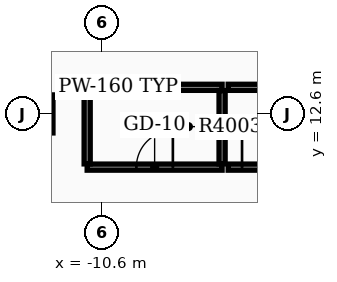
"""IFC4 building model, lengths in metres.
Left out: names, types, materials, properties, quantities, classifications, styles, units other than length and angle.
Written with IfcOpenShell. Run it as: python <this file> out.ifc"""

import sys

from ifc_helpers import new_model, si_unit, direction, frame, frame_2d, origin, origin_2d, place, context, subcontext, project, spatial, rectangle, extrude, element, fill, save


model = new_model("IFC4")
c1 = context("Model", 3, precision=1e-05, world=origin(), true_north=direction((0.0, 1.0)))
c2 = subcontext(c1, "Body", "Model", "MODEL_VIEW")
j1 = project(units=[si_unit("LENGTHUNIT", "METRE"), si_unit("PLANEANGLEUNIT", "RADIAN")], contexts=[c1])
p1 = place(None, origin())
s1 = spatial("IfcSite", under=j1, at=p1, CompositionType="ELEMENT")
p2 = place(p1, origin())
s2 = spatial("IfcBuilding", under=s1, at=p2, CompositionType="ELEMENT")
p3 = place(p2, frame((0.0, 0.0, 253.8)))
s3 = spatial("IfcBuildingStorey", under=s2, at=p3, CompositionType="ELEMENT", Elevation=253.8)
p4 = place(p3, frame((-12.4, 12.6, 0.0), z_axis=(0.0, 0.0, 1.0), x_axis=(1.0, 0.0, 0.0)))
e1 = element("IfcColumn", 1, at=p4, inside=s3, PredefinedType="COLUMN", context=c2, shape_type="SweptSolid", body=[
    extrude(rectangle(XDim=1.0, YDim=1.0, at=origin_2d()), origin(), (0.0, 0.0, 1.0), 3.9),
])
p5 = place(p3, frame((-11.0, 11.2, 0.0), z_axis=(0.0, 0.0, 1.0), x_axis=(1.0, 0.0, 0.0)))
e2 = element("IfcWall", 2, at=p5, inside=s3, PredefinedType="PARTITIONING", context=c2, shape_type="SweptSolid", body=[
    extrude(rectangle(XDim=3.55, YDim=0.16, at=frame_2d((1.775, 0.0))), origin(), (0.0, 0.0, 1.0), 3.17),
])
p6 = place(p5, frame((1.295, 0.0, 0.0)))
e3 = element("IfcOpeningElement", 3, at=p6, cuts=e2, PredefinedType="OPENING", context=c2, shape_type="SweptSolid", body=[
    extrude(rectangle(XDim=0.96, YDim=2.15, at=frame_2d((0.48, 1.075))), frame((0.0, 0.09, 0.0), z_axis=(0.0, -1.0, 0.0), x_axis=(1.0, 0.0, 0.0)), (0.0, 0.0, 1.0), 0.18),
])
p7 = place(p3, frame((-11.0, 13.3, 0.0), z_axis=(0.0, 0.0, 1.0), x_axis=(1.0, 0.0, 0.0)))
e4 = element("IfcWall", 4, at=p7, inside=s3, PredefinedType="PARTITIONING", context=c2, shape_type="SweptSolid", body=[
    extrude(rectangle(XDim=3.55, YDim=0.16, at=frame_2d((1.775, 0.0))), origin(), (0.0, 0.0, 1.0), 3.17),
])
for number, where, z_axis, x_axis in (
    (5, (-11.0, 11.285, 0.0), (0.0, 0.0, 1.0), (0.0, 1.0, 0.0)),
    (6, (-7.45, 11.285, 0.0), (0.0, 0.0, 1.0), (0.0, 1.0, 0.0)),
):
    element("IfcWall", number, at=place(p3, frame(where, z_axis=z_axis, x_axis=x_axis)), inside=s3, PredefinedType="PARTITIONING", context=c2, shape_type="SweptSolid", body=[
        extrude(rectangle(XDim=1.93, YDim=0.16, at=frame_2d((0.965, 0.0))), origin(), (0.0, 0.0, 1.0), 3.17),
    ])
p8 = place(p3, frame((-7.29, 11.2, 0.0), z_axis=(0.0, 0.0, 1.0), x_axis=(1.0, 0.0, 0.0)))
e7 = element("IfcWall", 7, at=p8, inside=s3, PredefinedType="PARTITIONING", context=c2, shape_type="SweptSolid", body=[
    extrude(rectangle(XDim=3.59, YDim=0.16, at=frame_2d((1.795, 0.0))), origin(), (0.0, 0.0, 1.0), 3.17),
])
p9 = place(p8, frame((0.365, 0.0, 0.0)))
e8 = element("IfcOpeningElement", 8, at=p9, cuts=e7, PredefinedType="OPENING", context=c2, shape_type="SweptSolid", body=[
    extrude(rectangle(XDim=0.96, YDim=2.15, at=frame_2d((0.48, 1.075))), frame((0.0, 0.09, 0.0), z_axis=(0.0, -1.0, 0.0), x_axis=(1.0, 0.0, 0.0)), (0.0, 0.0, 1.0), 0.18),
])
p10 = place(p3, frame((-7.29, 13.3, 0.0), z_axis=(0.0, 0.0, 1.0), x_axis=(1.0, 0.0, 0.0)))
e9 = element("IfcWall", 9, at=p10, inside=s3, PredefinedType="PARTITIONING", context=c2, shape_type="SweptSolid", body=[
    extrude(rectangle(XDim=3.59, YDim=0.16, at=frame_2d((1.795, 0.0))), origin(), (0.0, 0.0, 1.0), 3.17),
])
p11 = place(p6, origin())
e10 = element("IfcDoor", 10, at=p11, inside=s3, OperationType="SINGLE_SWING_RIGHT", PredefinedType="DOOR", context=c2, shape_type="SweptSolid", body=[
    extrude(rectangle(XDim=0.96, YDim=2.15, at=frame_2d((0.48, 1.075))), frame((0.0, 0.025, 0.0), z_axis=(0.0, -1.0, 0.0), x_axis=(1.0, 0.0, 0.0)), (0.0, 0.0, 1.0), 0.05),
])
fill(e3, e10)
p12 = place(p9, origin())
e11 = element("IfcDoor", 11, at=p12, inside=s3, OperationType="SINGLE_SWING_LEFT", PredefinedType="DOOR", context=c2, shape_type="SweptSolid", body=[
    extrude(rectangle(XDim=0.96, YDim=2.15, at=frame_2d((0.48, 1.075))), frame((0.0, 0.025, 0.0), z_axis=(0.0, -1.0, 0.0), x_axis=(1.0, 0.0, 0.0)), (0.0, 0.0, 1.0), 0.05),
])
fill(e8, e11)
save(model, sys.argv[1])
